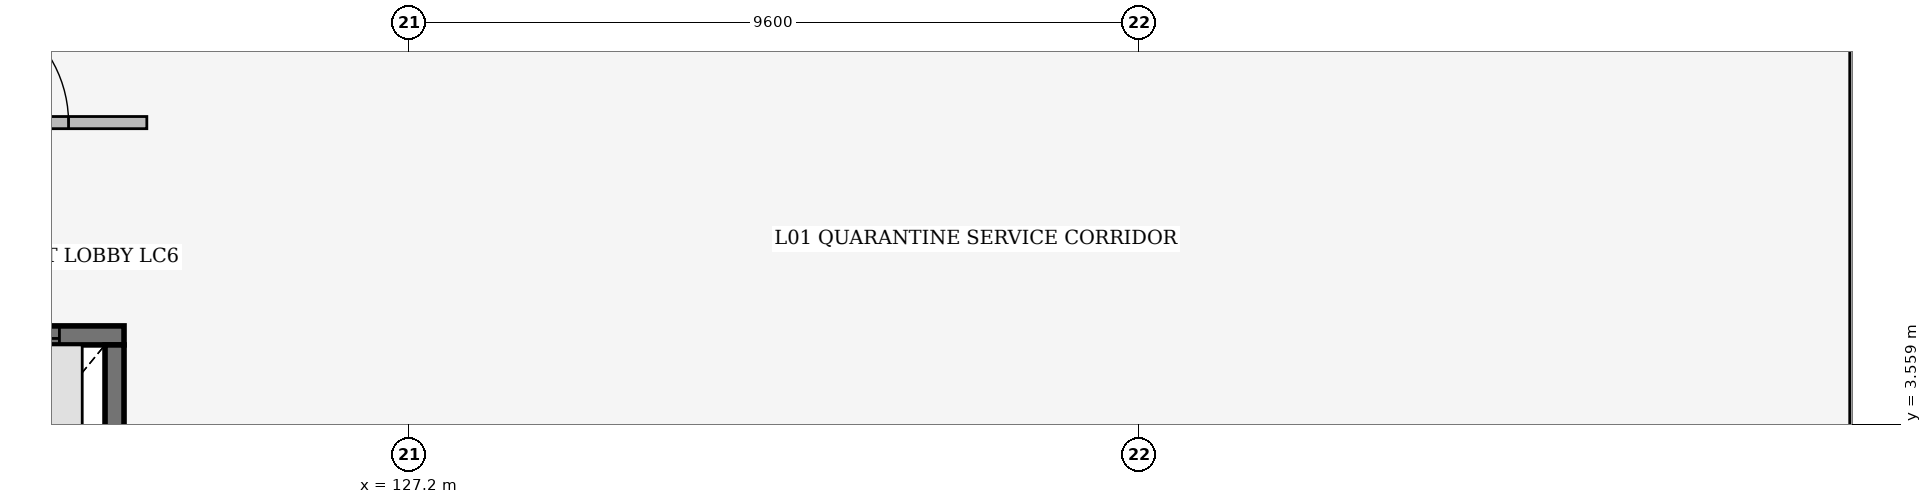
"""IFC4 building model, lengths in metres.
Left out: names, types, materials, properties, quantities, classifications, styles, units other than length and angle.
Written with IfcOpenShell. Run it as: python <this file> out.ifc"""

import sys

from ifc_helpers import new_model, si_unit, direction, frame, frame_2d, origin, place, context, subcontext, project, spatial, rectangle, extrude, element, fill, save


model = new_model("IFC4")
c1 = context("Model", 3, precision=1e-05, world=origin(), true_north=direction((0.0, 1.0)))
c2 = subcontext(c1, "Body", "Model", "MODEL_VIEW")
j1 = project(units=[si_unit("LENGTHUNIT", "METRE"), si_unit("PLANEANGLEUNIT", "RADIAN")], contexts=[c1])
p1 = place(None, origin())
s1 = spatial("IfcSite", under=j1, at=p1, CompositionType="ELEMENT")
p2 = place(p1, origin())
s2 = spatial("IfcBuilding", under=s1, at=p2, CompositionType="ELEMENT")
p3 = place(p2, frame((0.0, 0.0, 5.4)))
s3 = spatial("IfcBuildingStorey", under=s2, at=p3, CompositionType="ELEMENT", Elevation=5.4)
p4 = place(p3, frame((146.25, 0.6, 5.1), z_axis=(0.0, 0.0, 1.0), x_axis=(0.0, 1.0, 0.0)))
e1 = element("IfcWall", 1, at=p4, inside=s3, PredefinedType="PARAPET", context=c2, shape_type="SweptSolid", body=[
    extrude(rectangle(XDim=18.0, YDim=0.19, at=frame_2d((9.0, 0.0))), origin(), (0.0, 0.0, 1.0), 0.55),
])
p5 = place(p3, frame((120.15, 4.725, 0.0), z_axis=(0.0, 0.0, 1.0), x_axis=(1.0, 0.0, 0.0)))
e2 = element("IfcWall", 2, at=p5, inside=s3, PredefinedType="SHEAR", context=c2, shape_type="SweptSolid", body=[
    extrude(rectangle(XDim=3.3, YDim=0.25, at=frame_2d((1.65, 0.0))), origin(), (0.0, 0.0, 1.0), 4.75),
])
p6 = place(p5, frame((0.85, 0.0, 0.0)))
e3 = element("IfcOpeningElement", 3, at=p6, cuts=e2, PredefinedType="OPENING", context=c2, shape_type="SweptSolid", body=[
    extrude(rectangle(XDim=1.6, YDim=2.3, at=frame_2d((0.8, 1.15))), frame((0.0, 0.135, 0.0), z_axis=(0.0, -1.0, 0.0), x_axis=(1.0, 0.0, 0.0)), (0.0, 0.0, 1.0), 0.27),
])
p7 = place(p3, frame((123.325, 1.2, 0.0), z_axis=(0.0, 0.0, 1.0), x_axis=(0.0, 1.0, 0.0)))
e4 = element("IfcWall", 4, at=p7, inside=s3, PredefinedType="SHEAR", context=c2, shape_type="SweptSolid", body=[
    extrude(rectangle(XDim=3.4, YDim=0.25, at=frame_2d((1.7, 0.0))), origin(), (0.0, 0.0, 1.0), 4.75),
])
p8 = place(p3, frame((120.05, 7.525, 0.0), z_axis=(0.0, 0.0, 1.0), x_axis=(1.0, 0.0, 0.0)))
e5 = element("IfcWall", 5, at=p8, inside=s3, PredefinedType="PARTITIONING", context=c2, shape_type="SweptSolid", body=[
    extrude(rectangle(XDim=3.7, YDim=0.16, at=frame_2d((1.85, 0.0))), origin(), (0.0, 0.0, 1.0), 4.299),
])
p9 = place(p8, frame((1.03, 0.0, 0.0)))
e6 = element("IfcOpeningElement", 6, at=p9, cuts=e5, PredefinedType="OPENING", context=c2, shape_type="SweptSolid", body=[
    extrude(rectangle(XDim=1.64, YDim=2.35, at=frame_2d((0.82, 1.175))), frame((0.0, 0.09, 0.0), z_axis=(0.0, -1.0, 0.0), x_axis=(1.0, 0.0, 0.0)), (0.0, 0.0, 1.0), 0.18),
])
p10 = place(p6, origin())
e7 = element("IfcDoor", 7, at=p10, inside=s3, OperationType="DOUBLE_DOOR_SLIDING", PredefinedType="DOOR", context=c2, shape_type="SweptSolid", body=[
    extrude(rectangle(XDim=1.6, YDim=2.3, at=frame_2d((0.8, 1.15))), frame((0.0, 0.025, 0.0), z_axis=(0.0, -1.0, 0.0), x_axis=(1.0, 0.0, 0.0)), (0.0, 0.0, 1.0), 0.05),
])
fill(e3, e7)
p11 = place(p9, origin())
e8 = element("IfcDoor", 8, at=p11, inside=s3, OperationType="SINGLE_SWING_LEFT", PredefinedType="DOOR", context=c2, shape_type="SweptSolid", body=[
    extrude(rectangle(XDim=1.64, YDim=2.35, at=frame_2d((0.82, 1.175))), frame((0.0, 0.025, 0.0), z_axis=(0.0, -1.0, 0.0), x_axis=(1.0, 0.0, 0.0)), (0.0, 0.0, 1.0), 0.05),
])
fill(e6, e8)
save(model, sys.argv[1])
